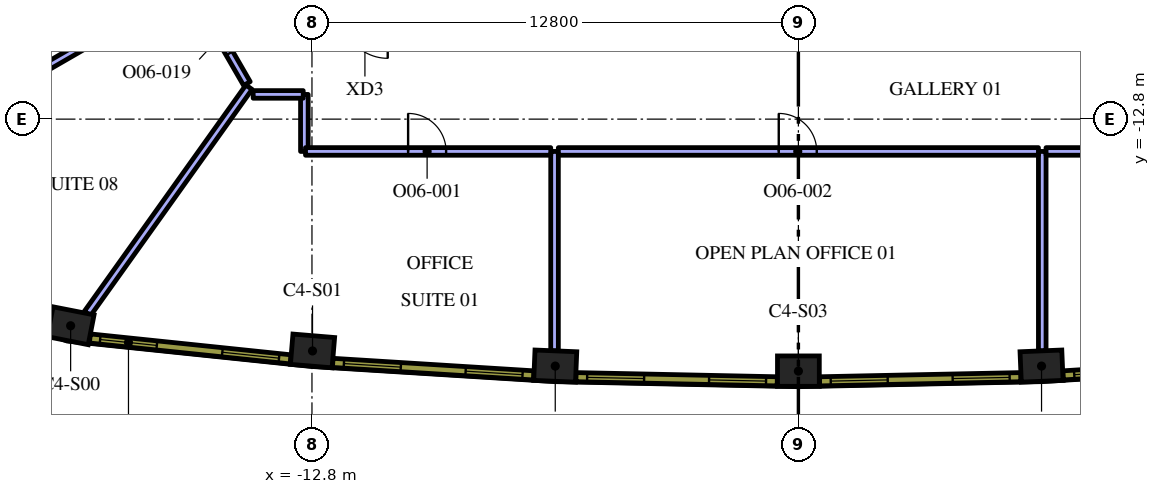
"""IFC4 building model, lengths in metres.
Left out: names, types, materials, properties, quantities, classifications, styles, units other than length and angle.
Written with IfcOpenShell. Run it as: python <this file> out.ifc"""

import sys

from ifc_helpers import new_model, si_unit, direction, frame, frame_2d, origin, origin_2d, place, context, subcontext, project, spatial, rectangle, extrude, element, fill, save


model = new_model("IFC4")
c1 = context("Model", 3, precision=1e-05, world=origin(), true_north=direction((0.0, 1.0)))
c2 = subcontext(c1, "Body", "Model", "MODEL_VIEW")
j1 = project(units=[si_unit("LENGTHUNIT", "METRE"), si_unit("PLANEANGLEUNIT", "RADIAN")], contexts=[c1])
p1 = place(None, origin())
s1 = spatial("IfcSite", under=j1, at=p1, CompositionType="ELEMENT")
p2 = place(p1, origin())
s2 = spatial("IfcBuilding", under=s1, at=p2, CompositionType="ELEMENT")
p3 = place(p2, frame((0.0, 0.0, 210.0)))
s3 = spatial("IfcBuildingStorey", under=s2, at=p3, CompositionType="ELEMENT", Elevation=210.0)
for number, where, z_axis, x_axis in (
    (1, (-19.15, -18.237, 0.0), (0.0, 0.0, 1.0), (0.981, -0.192, 0.0)),
    (2, (-12.785, -18.9, 0.0), (0.0, 0.0, 1.0), (0.997, -0.083, 0.0)),
    (3, (-6.398, -19.298, 0.0), (0.0, 0.0, 1.0), (0.999, -0.041, 0.0)),
    (4, (0.0, -19.431, 0.0), (0.0, 0.0, 1.0), (1.0, 0.0, 0.0)),
    (5, (6.398, -19.298, 0.0), (0.0, 0.0, 1.0), (0.999, 0.041, 0.0)),
):
    element("IfcColumn", number, at=place(p3, frame(where, z_axis=z_axis, x_axis=x_axis)), inside=s3, PredefinedType="COLUMN", context=c2, shape_type="SweptSolid", body=[
        extrude(rectangle(XDim=1.1, YDim=0.8, at=origin_2d()), origin(), (0.0, 0.0, 1.0), 4.2),
    ])
p4 = place(p3, frame((-6.417, -13.65, 0.0), z_axis=(0.0, 0.0, 1.0), x_axis=(0.0, -1.0, 0.0)))
e6 = element("IfcWall", 6, at=p4, inside=s3, PredefinedType="PARTITIONING", context=c2, shape_type="SweptSolid", body=[
    extrude(rectangle(XDim=5.247, YDim=0.2, at=frame_2d((2.624, 0.0))), origin(), (0.0, 0.0, 1.0), 3.45),
])
p5 = place(p3, frame((-18.709, -17.916, 0.0), z_axis=(0.0, 0.0, 1.0), x_axis=(0.581023578026, 0.813886725397, 0.0)))
e7 = element("IfcWall", 7, at=p5, inside=s3, PredefinedType="PARTITIONING", context=c2, shape_type="SweptSolid", body=[
    extrude(rectangle(XDim=7.318, YDim=0.2, at=frame_2d((3.659, 0.0))), origin(), (0.0, 0.0, 1.0), 3.45),
])
p6 = place(p3, frame((-13.0, -12.15, 0.0), z_axis=(0.0, 0.0, 1.0), x_axis=(0.0, -1.0, 0.0)))
e8 = element("IfcWall", 8, at=p6, inside=s3, PredefinedType="PARTITIONING", context=c2, shape_type="SweptSolid", body=[
    extrude(rectangle(XDim=1.5, YDim=0.2, at=frame_2d((0.75, 0.0))), origin(), (0.0, 0.0, 1.0), 3.45),
])
p7 = place(p3, frame((-12.97, -13.65, 0.0), z_axis=(0.0, 0.0, 1.0), x_axis=(1.0, 0.0, 0.0)))
e9 = element("IfcWall", 9, at=p7, inside=s3, PredefinedType="PARTITIONING", context=c2, shape_type="SweptSolid", body=[
    extrude(rectangle(XDim=6.453, YDim=0.2, at=frame_2d((3.227, 0.0))), origin(), (0.0, 0.0, 1.0), 3.45),
])
p8 = place(p7, frame((2.7, 0.0, 0.0)))
e10 = element("IfcOpeningElement", 10, at=p8, cuts=e9, PredefinedType="OPENING", context=c2, shape_type="SweptSolid", body=[
    extrude(rectangle(XDim=1.0, YDim=2.1, at=frame_2d((0.5, 1.05))), frame((0.0, 0.11, 0.0), z_axis=(0.0, -1.0, 0.0), x_axis=(1.0, 0.0, 0.0)), (0.0, 0.0, 1.0), 0.22),
])
p9 = place(p3, frame((-14.347, -12.15, 0.0), z_axis=(0.0, 0.0, 1.0), x_axis=(1.0, 0.0, 0.0)))
e11 = element("IfcWall", 11, at=p9, inside=s3, PredefinedType="PARTITIONING", context=c2, shape_type="SweptSolid", body=[
    extrude(rectangle(XDim=1.317, YDim=0.2, at=frame_2d((0.659, 0.0))), origin(), (0.0, 0.0, 1.0), 3.45),
])
p10 = place(p3, frame((6.417, -13.65, 0.0), z_axis=(0.0, 0.0, 1.0), x_axis=(0.0, -1.0, 0.0)))
e12 = element("IfcWall", 12, at=p10, inside=s3, PredefinedType="PARTITIONING", context=c2, shape_type="SweptSolid", body=[
    extrude(rectangle(XDim=5.247, YDim=0.2, at=frame_2d((2.624, 0.0))), origin(), (0.0, 0.0, 1.0), 3.45),
])
p11 = place(p3, frame((-6.317, -13.65, 0.0), z_axis=(0.0, 0.0, 1.0), x_axis=(1.0, 0.0, 0.0)))
e13 = element("IfcWall", 13, at=p11, inside=s3, PredefinedType="PARTITIONING", context=c2, shape_type="SweptSolid", body=[
    extrude(rectangle(XDim=12.634, YDim=0.2, at=frame_2d((6.317, 0.0))), origin(), (0.0, 0.0, 1.0), 3.45),
])
p12 = place(p11, frame((5.8, 0.0, 0.0)))
e14 = element("IfcOpeningElement", 14, at=p12, cuts=e13, PredefinedType="OPENING", context=c2, shape_type="SweptSolid", body=[
    extrude(rectangle(XDim=1.0, YDim=2.1, at=frame_2d((0.5, 1.05))), frame((0.0, 0.11, 0.0), z_axis=(0.0, -1.0, 0.0), x_axis=(1.0, 0.0, 0.0)), (0.0, 0.0, 1.0), 0.22),
])
p13 = place(p3, frame((6.517, -13.65, 0.0), z_axis=(0.0, 0.0, 1.0), x_axis=(1.0, 0.0, 0.0)))
e15 = element("IfcWall", 15, at=p13, inside=s3, PredefinedType="PARTITIONING", context=c2, shape_type="SweptSolid", body=[
    extrude(rectangle(XDim=6.483, YDim=0.2, at=frame_2d((3.242, 0.0))), origin(), (0.0, 0.0, 1.0), 3.45),
])
p14 = place(p13, frame((2.7, 0.0, 0.0)))
e16 = element("IfcOpeningElement", 16, at=p14, cuts=e15, PredefinedType="OPENING", context=c2, shape_type="SweptSolid", body=[
    extrude(rectangle(XDim=1.0, YDim=2.1, at=frame_2d((0.5, 1.05))), frame((0.0, 0.11, 0.0), z_axis=(0.0, -1.0, 0.0), x_axis=(1.0, 0.0, 0.0)), (0.0, 0.0, 1.0), 0.22),
])
p15 = place(p3, frame((-16.021, -9.25, 0.0), z_axis=(0.0, 0.0, 1.0), x_axis=(-0.86601739438, -0.500013872438, 0.0)))
e17 = element("IfcWall", 17, at=p15, inside=s3, PredefinedType="PARTITIONING", context=c2, shape_type="SweptSolid", body=[
    extrude(rectangle(XDim=6.478, YDim=0.2, at=frame_2d((3.239, 0.0))), origin(), (0.0, 0.0, 1.0), 3.45),
])
p16 = place(p3, frame((-15.971, -9.337, 0.0), z_axis=(0.0, 0.0, 1.0), x_axis=(0.500007233661, -0.866021227388, 0.0)))
e18 = element("IfcWall", 18, at=p16, inside=s3, PredefinedType="PARTITIONING", context=c2, shape_type="SweptSolid", body=[
    extrude(rectangle(XDim=2.919, YDim=0.2, at=frame_2d((1.459, 0.0))), origin(), (0.0, 0.0, 1.0), 3.45),
])
p17 = place(p16, frame((1.0, 0.0, 0.0)))
e19 = element("IfcOpeningElement", 19, at=p17, cuts=e18, PredefinedType="OPENING", context=c2, shape_type="SweptSolid", body=[
    extrude(rectangle(XDim=1.0, YDim=2.1, at=frame_2d((0.5, 1.05))), frame((0.0, 0.11, 0.0), z_axis=(0.0, -1.0, 0.0), x_axis=(1.0, 0.0, 0.0)), (0.0, 0.0, 1.0), 0.22),
])
p18 = place(p3, frame((-18.644, -18.571, 0.0), z_axis=(0.0, 0.0, 1.0), x_axis=(0.994621961215, -0.103571976272, 0.0)))
e20 = element("IfcWall", 20, at=p18, inside=s3, PredefinedType="SOLIDWALL", context=c2, shape_type="SweptSolid", body=[
    extrude(rectangle(XDim=5.311, YDim=0.24, at=frame_2d((2.655, 0.0))), origin(), (0.0, 0.0, 1.0), 3.95),
])
p19 = place(p18, frame((0.271, 0.0, 0.9)))
e21 = element("IfcOpeningElement", 21, at=p19, cuts=e20, PredefinedType="OPENING", context=c2, shape_type="SweptSolid", body=[
    extrude(rectangle(XDim=1.5, YDim=2.55, at=frame_2d((0.75, 1.275))), frame((0.0, 0.13, 0.0), z_axis=(0.0, -1.0, 0.0), x_axis=(1.0, 0.0, 0.0)), (0.0, 0.0, 1.0), 0.26),
])
p20 = place(p18, frame((3.504, 0.0, 0.9)))
e22 = element("IfcOpeningElement", 22, at=p20, cuts=e20, PredefinedType="OPENING", context=c2, shape_type="SweptSolid", body=[
    extrude(rectangle(XDim=1.5, YDim=2.55, at=frame_2d((0.75, 1.275))), frame((0.0, 0.13, 0.0), z_axis=(0.0, -1.0, 0.0), x_axis=(1.0, 0.0, 0.0)), (0.0, 0.0, 1.0), 0.26),
])
p21 = place(p3, frame((-12.253, -19.213, 0.0), z_axis=(0.0, 0.0, 1.0), x_axis=(0.9980633213, -0.062206162685, 0.0)))
e23 = element("IfcWall", 23, at=p21, inside=s3, PredefinedType="SOLIDWALL", context=c2, shape_type="SweptSolid", body=[
    extrude(rectangle(XDim=5.298, YDim=0.24, at=frame_2d((2.649, 0.0))), origin(), (0.0, 0.0, 1.0), 3.95),
])
p22 = place(p21, frame((0.294, 0.0, 0.9)))
e24 = element("IfcOpeningElement", 24, at=p22, cuts=e23, PredefinedType="OPENING", context=c2, shape_type="SweptSolid", body=[
    extrude(rectangle(XDim=1.5, YDim=2.55, at=frame_2d((0.75, 1.275))), frame((0.0, 0.13, 0.0), z_axis=(0.0, -1.0, 0.0), x_axis=(1.0, 0.0, 0.0)), (0.0, 0.0, 1.0), 0.26),
])
p23 = place(p21, frame((3.504, 0.0, 0.9)))
e25 = element("IfcOpeningElement", 25, at=p23, cuts=e23, PredefinedType="OPENING", context=c2, shape_type="SweptSolid", body=[
    extrude(rectangle(XDim=1.5, YDim=2.55, at=frame_2d((0.75, 1.275))), frame((0.0, 0.13, 0.0), z_axis=(0.0, -1.0, 0.0), x_axis=(1.0, 0.0, 0.0)), (0.0, 0.0, 1.0), 0.26),
])
p24 = place(p3, frame((-5.854, -19.589, 0.0), z_axis=(0.0, 0.0, 1.0), x_axis=(0.999784035184, -0.020781794712, 0.0)))
e26 = element("IfcWall", 26, at=p24, inside=s3, PredefinedType="SOLIDWALL", context=c2, shape_type="SweptSolid", body=[
    extrude(rectangle(XDim=5.298, YDim=0.24, at=frame_2d((2.649, 0.0))), origin(), (0.0, 0.0, 1.0), 3.95),
])
p25 = place(p24, frame((0.294, 0.0, 0.9)))
e27 = element("IfcOpeningElement", 27, at=p25, cuts=e26, PredefinedType="OPENING", context=c2, shape_type="SweptSolid", body=[
    extrude(rectangle(XDim=1.5, YDim=2.55, at=frame_2d((0.75, 1.275))), frame((0.0, 0.13, 0.0), z_axis=(0.0, -1.0, 0.0), x_axis=(1.0, 0.0, 0.0)), (0.0, 0.0, 1.0), 0.26),
])
p26 = place(p24, frame((3.504, 0.0, 0.9)))
e28 = element("IfcOpeningElement", 28, at=p26, cuts=e26, PredefinedType="OPENING", context=c2, shape_type="SweptSolid", body=[
    extrude(rectangle(XDim=1.5, YDim=2.55, at=frame_2d((0.75, 1.275))), frame((0.0, 0.13, 0.0), z_axis=(0.0, -1.0, 0.0), x_axis=(1.0, 0.0, 0.0)), (0.0, 0.0, 1.0), 0.26),
])
p27 = place(p3, frame((0.556, -19.699, 0.0), z_axis=(0.0, 0.0, 1.0), x_axis=(0.999784035184, 0.020781794712, 0.0)))
e29 = element("IfcWall", 29, at=p27, inside=s3, PredefinedType="SOLIDWALL", context=c2, shape_type="SweptSolid", body=[
    extrude(rectangle(XDim=5.298, YDim=0.24, at=frame_2d((2.649, 0.0))), origin(), (0.0, 0.0, 1.0), 3.95),
])
p28 = place(p27, frame((0.294, 0.0, 0.9)))
e30 = element("IfcOpeningElement", 30, at=p28, cuts=e29, PredefinedType="OPENING", context=c2, shape_type="SweptSolid", body=[
    extrude(rectangle(XDim=1.5, YDim=2.55, at=frame_2d((0.75, 1.275))), frame((0.0, 0.13, 0.0), z_axis=(0.0, -1.0, 0.0), x_axis=(1.0, 0.0, 0.0)), (0.0, 0.0, 1.0), 0.26),
])
p29 = place(p27, frame((3.504, 0.0, 0.9)))
e31 = element("IfcOpeningElement", 31, at=p29, cuts=e29, PredefinedType="OPENING", context=c2, shape_type="SweptSolid", body=[
    extrude(rectangle(XDim=1.5, YDim=2.55, at=frame_2d((0.75, 1.275))), frame((0.0, 0.13, 0.0), z_axis=(0.0, -1.0, 0.0), x_axis=(1.0, 0.0, 0.0)), (0.0, 0.0, 1.0), 0.26),
])
p30 = place(p3, frame((6.965, -19.543, 0.0), z_axis=(0.0, 0.0, 1.0), x_axis=(0.9980633213, 0.062206162685, 0.0)))
e32 = element("IfcWall", 32, at=p30, inside=s3, PredefinedType="SOLIDWALL", context=c2, shape_type="SweptSolid", body=[
    extrude(rectangle(XDim=5.298, YDim=0.24, at=frame_2d((2.649, 0.0))), origin(), (0.0, 0.0, 1.0), 3.95),
])
p31 = place(p30, frame((0.295, 0.0, 0.9)))
e33 = element("IfcOpeningElement", 33, at=p31, cuts=e32, PredefinedType="OPENING", context=c2, shape_type="SweptSolid", body=[
    extrude(rectangle(XDim=1.5, YDim=2.55, at=frame_2d((0.75, 1.275))), frame((0.0, 0.13, 0.0), z_axis=(0.0, -1.0, 0.0), x_axis=(1.0, 0.0, 0.0)), (0.0, 0.0, 1.0), 0.26),
])
p32 = place(p30, frame((3.504, 0.0, 0.9)))
e34 = element("IfcOpeningElement", 34, at=p32, cuts=e32, PredefinedType="OPENING", context=c2, shape_type="SweptSolid", body=[
    extrude(rectangle(XDim=1.5, YDim=2.55, at=frame_2d((0.75, 1.275))), frame((0.0, 0.13, 0.0), z_axis=(0.0, -1.0, 0.0), x_axis=(1.0, 0.0, 0.0)), (0.0, 0.0, 1.0), 0.26),
])
p33 = place(p8, origin())
e35 = element("IfcDoor", 35, at=p33, inside=s3, OperationType="SINGLE_SWING_LEFT", PredefinedType="DOOR", context=c2, shape_type="SweptSolid", body=[
    extrude(rectangle(XDim=1.0, YDim=2.1, at=frame_2d((0.5, 1.05))), frame((0.0, 0.025, 0.0), z_axis=(0.0, -1.0, 0.0), x_axis=(1.0, 0.0, 0.0)), (0.0, 0.0, 1.0), 0.05),
])
fill(e10, e35)
p34 = place(p12, origin())
e36 = element("IfcDoor", 36, at=p34, inside=s3, OperationType="SINGLE_SWING_LEFT", PredefinedType="DOOR", context=c2, shape_type="SweptSolid", body=[
    extrude(rectangle(XDim=1.0, YDim=2.1, at=frame_2d((0.5, 1.05))), frame((0.0, 0.025, 0.0), z_axis=(0.0, -1.0, 0.0), x_axis=(1.0, 0.0, 0.0)), (0.0, 0.0, 1.0), 0.05),
])
fill(e14, e36)
p35 = place(p17, origin())
e37 = element("IfcDoor", 37, at=p35, inside=s3, OperationType="SINGLE_SWING_RIGHT", PredefinedType="DOOR", context=c2, shape_type="SweptSolid", body=[
    extrude(rectangle(XDim=1.0, YDim=2.1, at=frame_2d((0.5, 1.05))), frame((0.0, 0.025, 0.0), z_axis=(0.0, -1.0, 0.0), x_axis=(1.0, 0.0, 0.0)), (0.0, 0.0, 1.0), 0.05),
])
fill(e19, e37)
p36 = place(p19, origin())
e38 = element("IfcWindow", 38, at=p36, inside=s3, PartitioningType="SINGLE_PANEL", PredefinedType="WINDOW", context=c2, shape_type="SweptSolid", body=[
    extrude(rectangle(XDim=1.5, YDim=2.55, at=frame_2d((0.75, 1.275))), frame((0.0, 0.04, 0.0), z_axis=(0.0, -1.0, 0.0), x_axis=(1.0, 0.0, 0.0)), (0.0, 0.0, 1.0), 0.06),
])
fill(e21, e38)
p37 = place(p20, origin())
e39 = element("IfcWindow", 39, at=p37, inside=s3, PartitioningType="SINGLE_PANEL", PredefinedType="WINDOW", context=c2, shape_type="SweptSolid", body=[
    extrude(rectangle(XDim=1.5, YDim=2.55, at=frame_2d((0.75, 1.275))), frame((0.0, 0.04, 0.0), z_axis=(0.0, -1.0, 0.0), x_axis=(1.0, 0.0, 0.0)), (0.0, 0.0, 1.0), 0.06),
])
fill(e22, e39)
p38 = place(p22, origin())
e40 = element("IfcWindow", 40, at=p38, inside=s3, PartitioningType="SINGLE_PANEL", PredefinedType="WINDOW", context=c2, shape_type="SweptSolid", body=[
    extrude(rectangle(XDim=1.5, YDim=2.55, at=frame_2d((0.75, 1.275))), frame((0.0, 0.04, 0.0), z_axis=(0.0, -1.0, 0.0), x_axis=(1.0, 0.0, 0.0)), (0.0, 0.0, 1.0), 0.06),
])
fill(e24, e40)
p39 = place(p23, origin())
e41 = element("IfcWindow", 41, at=p39, inside=s3, PartitioningType="SINGLE_PANEL", PredefinedType="WINDOW", context=c2, shape_type="SweptSolid", body=[
    extrude(rectangle(XDim=1.5, YDim=2.55, at=frame_2d((0.75, 1.275))), frame((0.0, 0.04, 0.0), z_axis=(0.0, -1.0, 0.0), x_axis=(1.0, 0.0, 0.0)), (0.0, 0.0, 1.0), 0.06),
])
fill(e25, e41)
p40 = place(p25, origin())
e42 = element("IfcWindow", 42, at=p40, inside=s3, PartitioningType="SINGLE_PANEL", PredefinedType="WINDOW", context=c2, shape_type="SweptSolid", body=[
    extrude(rectangle(XDim=1.5, YDim=2.55, at=frame_2d((0.75, 1.275))), frame((0.0, 0.04, 0.0), z_axis=(0.0, -1.0, 0.0), x_axis=(1.0, 0.0, 0.0)), (0.0, 0.0, 1.0), 0.06),
])
fill(e27, e42)
p41 = place(p26, origin())
e43 = element("IfcWindow", 43, at=p41, inside=s3, PartitioningType="SINGLE_PANEL", PredefinedType="WINDOW", context=c2, shape_type="SweptSolid", body=[
    extrude(rectangle(XDim=1.5, YDim=2.55, at=frame_2d((0.75, 1.275))), frame((0.0, 0.04, 0.0), z_axis=(0.0, -1.0, 0.0), x_axis=(1.0, 0.0, 0.0)), (0.0, 0.0, 1.0), 0.06),
])
fill(e28, e43)
p42 = place(p28, origin())
e44 = element("IfcWindow", 44, at=p42, inside=s3, PartitioningType="SINGLE_PANEL", PredefinedType="WINDOW", context=c2, shape_type="SweptSolid", body=[
    extrude(rectangle(XDim=1.5, YDim=2.55, at=frame_2d((0.75, 1.275))), frame((0.0, 0.04, 0.0), z_axis=(0.0, -1.0, 0.0), x_axis=(1.0, 0.0, 0.0)), (0.0, 0.0, 1.0), 0.06),
])
fill(e30, e44)
p43 = place(p29, origin())
e45 = element("IfcWindow", 45, at=p43, inside=s3, PartitioningType="SINGLE_PANEL", PredefinedType="WINDOW", context=c2, shape_type="SweptSolid", body=[
    extrude(rectangle(XDim=1.5, YDim=2.55, at=frame_2d((0.75, 1.275))), frame((0.0, 0.04, 0.0), z_axis=(0.0, -1.0, 0.0), x_axis=(1.0, 0.0, 0.0)), (0.0, 0.0, 1.0), 0.06),
])
fill(e31, e45)
p44 = place(p31, origin())
e46 = element("IfcWindow", 46, at=p44, inside=s3, PartitioningType="SINGLE_PANEL", PredefinedType="WINDOW", context=c2, shape_type="SweptSolid", body=[
    extrude(rectangle(XDim=1.5, YDim=2.55, at=frame_2d((0.75, 1.275))), frame((0.0, 0.04, 0.0), z_axis=(0.0, -1.0, 0.0), x_axis=(1.0, 0.0, 0.0)), (0.0, 0.0, 1.0), 0.06),
])
fill(e33, e46)
save(model, sys.argv[1])
